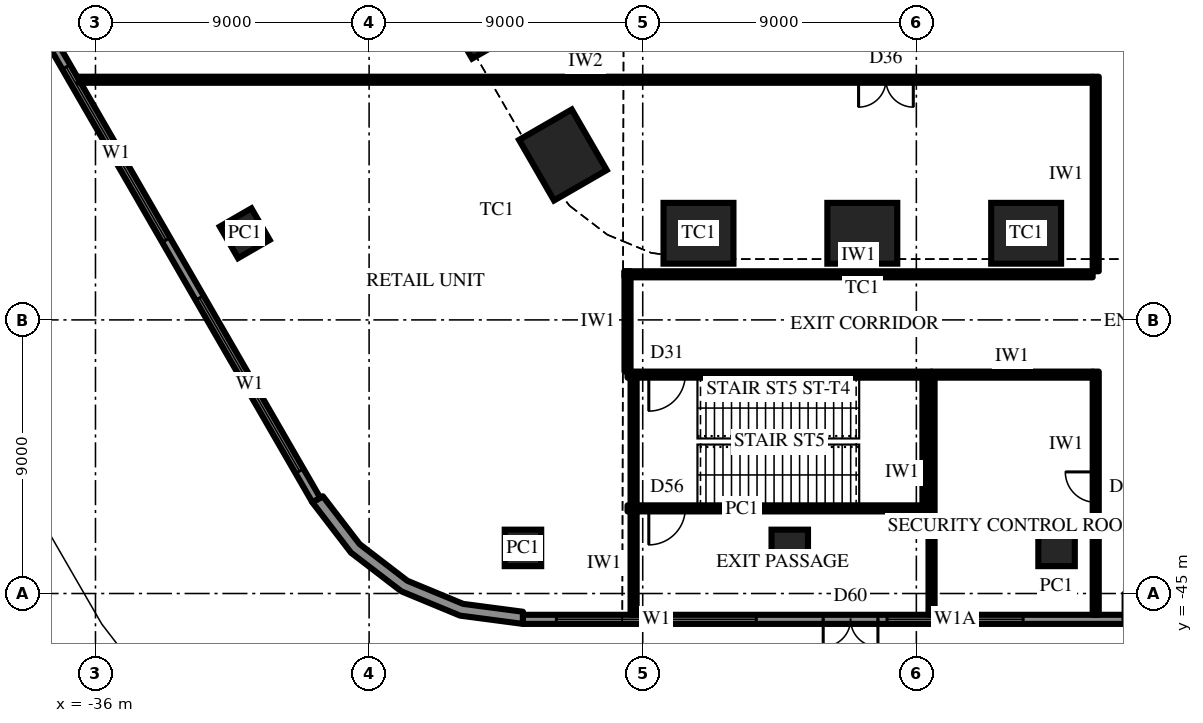
"""IFC4 building model, lengths in metres.
Left out: names, types, materials, properties, quantities, classifications, styles, units other than length and angle.
Written with IfcOpenShell. Run it as: python <this file> out.ifc"""

import sys

from ifc_helpers import new_model, si_unit, direction, frame, frame_2d, origin, origin_2d, place, context, subcontext, project, spatial, polyline, rectangle, outline, extrude, element, fill, save


model = new_model("IFC4")
c1 = context("Model", 3, precision=1e-05, world=origin(), true_north=direction((0.0, 1.0)))
c2 = subcontext(c1, "Body", "Model", "MODEL_VIEW")
j1 = project(units=[si_unit("LENGTHUNIT", "METRE"), si_unit("PLANEANGLEUNIT", "RADIAN")], contexts=[c1])
p1 = place(None, origin())
s1 = spatial("IfcSite", under=j1, at=p1, CompositionType="ELEMENT")
p2 = place(p1, origin())
s2 = spatial("IfcBuilding", under=s1, at=p2, CompositionType="ELEMENT")
p3 = place(p2, origin())
s3 = spatial("IfcBuildingStorey", under=s2, at=p3, CompositionType="ELEMENT", Elevation=0.0)
for number, where, z_axis, x_axis in (
    (1, (-23.32, -25.908, 0.0), (0.0, 0.0, 1.0), (0.5, -0.866, 0.0)),
    (2, (-20.626, -30.575, 0.0), (0.0, 0.0, 1.0), (0.5, -0.866, 0.0)),
    (3, (-16.166, -33.15, 0.0), (0.0, 0.0, 1.0), (1.0, 0.0, 0.0)),
    (4, (-10.777, -33.15, 0.0), (0.0, 0.0, 1.0), (1.0, 0.0, 0.0)),
    (5, (-5.389, -33.15, 0.0), (0.0, 0.0, 1.0), (1.0, 0.0, 0.0)),
):
    element("IfcColumn", number, at=place(p3, frame(where, z_axis=z_axis, x_axis=x_axis)), inside=s3, PredefinedType="COLUMN", context=c2, shape_type="SweptSolid", body=[
        extrude(rectangle(XDim=2.3, YDim=2.0, at=origin_2d()), origin(), (0.0, 0.0, 1.0), 7.0),
    ])
p4 = place(p3, frame((-18.5, -42.2, 0.0), z_axis=(0.0, 0.0, 1.0), x_axis=(1.0, 0.0, 0.0)))
e6 = element("IfcWall", 6, at=p4, inside=s3, PredefinedType="SHEAR", context=c2, shape_type="SweptSolid", body=[
    extrude(rectangle(XDim=10.0, YDim=0.2, at=frame_2d((5.0, 0.0))), origin(), (0.0, 0.0, 1.0), 7.0),
])
p5 = place(p4, frame((0.7, 0.0, 0.0)))
e7 = element("IfcOpeningElement", 7, at=p5, cuts=e6, PredefinedType="OPENING", context=c2, shape_type="SweptSolid", body=[
    extrude(rectangle(XDim=1.2, YDim=2.2, at=frame_2d((0.6, 1.1))), frame((0.0, 0.11, 0.0), z_axis=(0.0, -1.0, 0.0), x_axis=(1.0, 0.0, 0.0)), (0.0, 0.0, 1.0), 0.22),
])
p6 = place(p3, frame((-8.5, -37.8, 0.0), z_axis=(0.0, 0.0, 1.0), x_axis=(-1.0, 0.0, 0.0)))
e8 = element("IfcWall", 8, at=p6, inside=s3, PredefinedType="SHEAR", context=c2, shape_type="SweptSolid", body=[
    extrude(rectangle(XDim=10.0, YDim=0.2, at=frame_2d((5.0, 0.0))), origin(), (0.0, 0.0, 1.0), 7.0),
])
p7 = place(p6, frame((8.1, 0.0, 0.0)))
e9 = element("IfcOpeningElement", 9, at=p7, cuts=e8, PredefinedType="OPENING", context=c2, shape_type="SweptSolid", body=[
    extrude(rectangle(XDim=1.2, YDim=2.2, at=frame_2d((0.6, 1.1))), frame((0.0, 0.11, 0.0), z_axis=(0.0, -1.0, 0.0), x_axis=(1.0, 0.0, 0.0)), (0.0, 0.0, 1.0), 0.22),
])
for number, where, z_axis, x_axis in (
    (10, (-18.3, -37.9, 0.0), (0.0, 0.0, 1.0), (0.0, -1.0, 0.0)),
    (11, (-8.7, -42.1, 0.0), (0.0, 0.0, 1.0), (0.0, 1.0, 0.0)),
):
    element("IfcWall", number, at=place(p3, frame(where, z_axis=z_axis, x_axis=x_axis)), inside=s3, PredefinedType="SHEAR", context=c2, shape_type="SweptSolid", body=[
        extrude(rectangle(XDim=4.2, YDim=0.2, at=frame_2d((2.1, 0.0))), origin(), (0.0, 0.0, 1.0), 7.0),
    ])
for number, where, z_axis, x_axis in (
    (12, (-31.09, -33.15, 0.0), (0.0, 0.0, 1.0), (0.5, -0.866, 0.0)),
    (13, (-21.939, -43.5, 0.0), (0.0, 0.0, 1.0), (1.0, 0.0, 0.0)),
    (14, (-13.164, -43.5, 0.0), (0.0, 0.0, 1.0), (1.0, 0.0, 0.0)),
    (15, (-4.388, -43.5, 0.0), (0.0, 0.0, 1.0), (1.0, 0.0, 0.0)),
):
    element("IfcColumn", number, at=place(p3, frame(where, z_axis=z_axis, x_axis=x_axis)), inside=s3, PredefinedType="COLUMN", context=c2, shape_type="SweptSolid", body=[
        extrude(rectangle(XDim=1.2, YDim=1.2, at=origin_2d()), origin(), (0.0, 0.0, 1.0), 7.0),
    ])
p8 = place(p3, origin())
e16 = element("IfcWall", 16, at=p8, inside=s3, PredefinedType="SOLIDWALL", context=c2, shape_type="SweptSolid", body=[
    extrude(outline(polyline([(-28.867, -42.0), (-27.596, -43.657), (-25.939, -44.928), (-24.01, -45.727), (-21.939, -46.0), (-21.939, -45.6), (-23.906, -45.341), (-25.739, -44.582), (-27.313, -43.374), (-28.521, -41.8), (-28.867, -42.0)])), origin(), (0.0, 0.0, 1.0), 6.65),
])
p9 = place(p3, frame((-50.677, -3.925, 0.0), z_axis=(0.0, 0.0, 1.0), x_axis=(0.500002442456, -0.866023993627, 0.0)))
e17 = element("IfcWall", 17, at=p9, inside=s3, PredefinedType="SOLIDWALL", context=c2, shape_type="SweptSolid", body=[
    extrude(rectangle(XDim=43.879, YDim=0.3, at=frame_2d((21.939, 0.0))), origin(), (0.0, 0.0, 1.0), 6.65),
])
p10 = place(p9, frame((1.1, 0.0, 0.3)))
e18 = element("IfcOpeningElement", 18, at=p10, cuts=e17, PredefinedType="OPENING", context=c2, shape_type="SweptSolid", body=[
    extrude(rectangle(XDim=6.576, YDim=5.0, at=frame_2d((3.288, 2.5))), frame((0.0, 0.16, 0.0), z_axis=(0.0, -1.0, 0.0), x_axis=(1.0, 0.0, 0.0)), (0.0, 0.0, 1.0), 0.32),
])
p11 = place(p9, frame((9.875, 0.0, 0.3)))
e19 = element("IfcOpeningElement", 19, at=p11, cuts=e17, PredefinedType="OPENING", context=c2, shape_type="SweptSolid", body=[
    extrude(rectangle(XDim=6.576, YDim=5.0, at=frame_2d((3.288, 2.5))), frame((0.0, 0.16, 0.0), z_axis=(0.0, -1.0, 0.0), x_axis=(1.0, 0.0, 0.0)), (0.0, 0.0, 1.0), 0.32),
])
p12 = place(p9, frame((19.739, 0.0, 0.0)))
e20 = element("IfcOpeningElement", 20, at=p12, cuts=e17, PredefinedType="OPENING", context=c2, shape_type="SweptSolid", body=[
    extrude(rectangle(XDim=1.8, YDim=2.7, at=frame_2d((0.9, 1.35))), frame((0.0, 0.16, 0.0), z_axis=(0.0, -1.0, 0.0), x_axis=(1.0, 0.0, 0.0)), (0.0, 0.0, 1.0), 0.32),
])
p13 = place(p9, frame((22.339, 0.0, 0.0)))
e21 = element("IfcOpeningElement", 21, at=p13, cuts=e17, PredefinedType="OPENING", context=c2, shape_type="SweptSolid", body=[
    extrude(rectangle(XDim=1.8, YDim=2.7, at=frame_2d((0.9, 1.35))), frame((0.0, 0.16, 0.0), z_axis=(0.0, -1.0, 0.0), x_axis=(1.0, 0.0, 0.0)), (0.0, 0.0, 1.0), 0.32),
])
p14 = place(p9, frame((27.427, 0.0, 0.3)))
e22 = element("IfcOpeningElement", 22, at=p14, cuts=e17, PredefinedType="OPENING", context=c2, shape_type="SweptSolid", body=[
    extrude(rectangle(XDim=6.576, YDim=5.0, at=frame_2d((3.288, 2.5))), frame((0.0, 0.16, 0.0), z_axis=(0.0, -1.0, 0.0), x_axis=(1.0, 0.0, 0.0)), (0.0, 0.0, 1.0), 0.32),
])
p15 = place(p9, frame((36.203, 0.0, 0.3)))
e23 = element("IfcOpeningElement", 23, at=p15, cuts=e17, PredefinedType="OPENING", context=c2, shape_type="SweptSolid", body=[
    extrude(rectangle(XDim=6.576, YDim=5.0, at=frame_2d((3.288, 2.5))), frame((0.0, 0.16, 0.0), z_axis=(0.0, -1.0, 0.0), x_axis=(1.0, 0.0, 0.0)), (0.0, 0.0, 1.0), 0.32),
])
p16 = place(p3, frame((-21.939, -45.85, 0.0), z_axis=(0.0, 0.0, 1.0), x_axis=(1.0, 0.0, 0.0)))
e24 = element("IfcWall", 24, at=p16, inside=s3, PredefinedType="SOLIDWALL", context=c2, shape_type="SweptSolid", body=[
    extrude(rectangle(XDim=43.878, YDim=0.3, at=frame_2d((21.939, 0.0))), origin(), (0.0, 0.0, 1.0), 6.65),
])
p17 = place(p16, frame((1.1, 0.0, 0.3)))
e25 = element("IfcOpeningElement", 25, at=p17, cuts=e24, PredefinedType="OPENING", context=c2, shape_type="SweptSolid", body=[
    extrude(rectangle(XDim=6.576, YDim=5.0, at=frame_2d((3.288, 2.5))), frame((0.0, 0.16, 0.0), z_axis=(0.0, -1.0, 0.0), x_axis=(1.0, 0.0, 0.0)), (0.0, 0.0, 1.0), 0.32),
])
p18 = place(p16, frame((9.875, 0.0, 0.0)))
e26 = element("IfcOpeningElement", 26, at=p18, cuts=e24, PredefinedType="OPENING", context=c2, shape_type="SweptSolid", body=[
    extrude(rectangle(XDim=1.8, YDim=2.4, at=frame_2d((0.9, 1.2))), frame((0.0, 0.16, 0.0), z_axis=(0.0, -1.0, 0.0), x_axis=(1.0, 0.0, 0.0)), (0.0, 0.0, 1.0), 0.32),
])
p19 = place(p16, frame((11.976, 0.0, 0.3)))
e27 = element("IfcOpeningElement", 27, at=p19, cuts=e24, PredefinedType="OPENING", context=c2, shape_type="SweptSolid", body=[
    extrude(rectangle(XDim=4.476, YDim=5.0, at=frame_2d((2.238, 2.5))), frame((0.0, 0.16, 0.0), z_axis=(0.0, -1.0, 0.0), x_axis=(1.0, 0.0, 0.0)), (0.0, 0.0, 1.0), 0.32),
])
p20 = place(p16, frame((19.739, 0.0, 0.0)))
e28 = element("IfcOpeningElement", 28, at=p20, cuts=e24, PredefinedType="OPENING", context=c2, shape_type="SweptSolid", body=[
    extrude(rectangle(XDim=1.8, YDim=2.7, at=frame_2d((0.9, 1.35))), frame((0.0, 0.16, 0.0), z_axis=(0.0, -1.0, 0.0), x_axis=(1.0, 0.0, 0.0)), (0.0, 0.0, 1.0), 0.32),
])
p21 = place(p16, frame((22.339, 0.0, 0.0)))
e29 = element("IfcOpeningElement", 29, at=p21, cuts=e24, PredefinedType="OPENING", context=c2, shape_type="SweptSolid", body=[
    extrude(rectangle(XDim=1.8, YDim=2.7, at=frame_2d((0.9, 1.35))), frame((0.0, 0.16, 0.0), z_axis=(0.0, -1.0, 0.0), x_axis=(1.0, 0.0, 0.0)), (0.0, 0.0, 1.0), 0.32),
])
p22 = place(p16, frame((32.203, 0.0, 0.0)))
e30 = element("IfcOpeningElement", 30, at=p22, cuts=e24, PredefinedType="OPENING", context=c2, shape_type="SweptSolid", body=[
    extrude(rectangle(XDim=1.8, YDim=2.4, at=frame_2d((0.9, 1.2))), frame((0.0, 0.16, 0.0), z_axis=(0.0, -1.0, 0.0), x_axis=(1.0, 0.0, 0.0)), (0.0, 0.0, 1.0), 0.32),
])
p23 = place(p16, frame((27.427, 0.0, 0.3)))
e31 = element("IfcOpeningElement", 31, at=p23, cuts=e24, PredefinedType="OPENING", context=c2, shape_type="SweptSolid", body=[
    extrude(rectangle(XDim=4.476, YDim=5.0, at=frame_2d((2.238, 2.5))), frame((0.0, 0.16, 0.0), z_axis=(0.0, -1.0, 0.0), x_axis=(1.0, 0.0, 0.0)), (0.0, 0.0, 1.0), 0.32),
])
p24 = place(p16, frame((36.203, 0.0, 0.3)))
e32 = element("IfcOpeningElement", 32, at=p24, cuts=e24, PredefinedType="OPENING", context=c2, shape_type="SweptSolid", body=[
    extrude(rectangle(XDim=6.576, YDim=5.0, at=frame_2d((3.288, 2.5))), frame((0.0, 0.16, 0.0), z_axis=(0.0, -1.0, 0.0), x_axis=(1.0, 0.0, 0.0)), (0.0, 0.0, 1.0), 0.32),
])
p25 = place(p3, frame((-36.546, -28.1, 0.0), z_axis=(0.0, 0.0, 1.0), x_axis=(1.0, 0.0, 0.0)))
e33 = element("IfcWall", 33, at=p25, inside=s3, PredefinedType="PARTITIONING", context=c2, shape_type="SweptSolid", body=[
    extrude(rectangle(XDim=33.346, YDim=0.2, at=frame_2d((16.673, 0.0))), origin(), (0.0, 0.0, 1.0), 6.65),
])
p26 = place(p25, frame((25.646, 0.0, 0.0)))
e34 = element("IfcOpeningElement", 34, at=p26, cuts=e33, PredefinedType="OPENING", context=c2, shape_type="SweptSolid", body=[
    extrude(rectangle(XDim=1.8, YDim=2.4, at=frame_2d((0.9, 1.2))), frame((0.0, 0.11, 0.0), z_axis=(0.0, -1.0, 0.0), x_axis=(1.0, 0.0, 0.0)), (0.0, 0.0, 1.0), 0.22),
])
p27 = place(p3, frame((-3.1, -45.7, 0.0), z_axis=(0.0, 0.0, 1.0), x_axis=(0.0, 1.0, 0.0)))
e35 = element("IfcWall", 35, at=p27, inside=s3, PredefinedType="PARTITIONING", context=c2, shape_type="SweptSolid", body=[
    extrude(rectangle(XDim=8.0, YDim=0.2, at=frame_2d((4.0, 0.0))), origin(), (0.0, 0.0, 1.0), 6.65),
])
p28 = place(p27, frame((3.7, 0.0, 0.0)))
e36 = element("IfcOpeningElement", 36, at=p28, cuts=e35, PredefinedType="OPENING", context=c2, shape_type="SweptSolid", body=[
    extrude(rectangle(XDim=1.0, YDim=2.2, at=frame_2d((0.5, 1.1))), frame((0.0, 0.11, 0.0), z_axis=(0.0, -1.0, 0.0), x_axis=(1.0, 0.0, 0.0)), (0.0, 0.0, 1.0), 0.22),
])
p29 = place(p3, frame((-3.1, -34.4, 0.0), z_axis=(0.0, 0.0, 1.0), x_axis=(0.0, 1.0, 0.0)))
e37 = element("IfcWall", 37, at=p29, inside=s3, PredefinedType="PARTITIONING", context=c2, shape_type="SweptSolid", body=[
    extrude(rectangle(XDim=6.4, YDim=0.2, at=frame_2d((3.2, 0.0))), origin(), (0.0, 0.0, 1.0), 6.65),
])
p30 = place(p3, frame((-18.6, -34.5, 0.0), z_axis=(0.0, 0.0, 1.0), x_axis=(1.0, 0.0, 0.0)))
e38 = element("IfcWall", 38, at=p30, inside=s3, PredefinedType="PARTITIONING", context=c2, shape_type="SweptSolid", body=[
    extrude(rectangle(XDim=15.4, YDim=0.2, at=frame_2d((7.7, 0.0))), origin(), (0.0, 0.0, 1.0), 6.65),
])
p31 = place(p3, frame((-18.5, -37.7, 0.0), z_axis=(0.0, 0.0, 1.0), x_axis=(0.0, 1.0, 0.0)))
e39 = element("IfcWall", 39, at=p31, inside=s3, PredefinedType="PARTITIONING", context=c2, shape_type="SweptSolid", body=[
    extrude(rectangle(XDim=3.3, YDim=0.2, at=frame_2d((1.65, 0.0))), origin(), (0.0, 0.0, 1.0), 6.65),
])
p32 = place(p3, frame((-8.5, -37.8, 0.0), z_axis=(0.0, 0.0, 1.0), x_axis=(1.0, 0.0, 0.0)))
e40 = element("IfcWall", 40, at=p32, inside=s3, PredefinedType="PARTITIONING", context=c2, shape_type="SweptSolid", body=[
    extrude(rectangle(XDim=5.3, YDim=0.2, at=frame_2d((2.65, 0.0))), origin(), (0.0, 0.0, 1.0), 6.65),
])
p33 = place(p3, frame((-8.5, -45.7, 0.0), z_axis=(0.0, 0.0, 1.0), x_axis=(0.0, 1.0, 0.0)))
e41 = element("IfcWall", 41, at=p33, inside=s3, PredefinedType="PARTITIONING", context=c2, shape_type="SweptSolid", body=[
    extrude(rectangle(XDim=7.8, YDim=0.2, at=frame_2d((3.9, 0.0))), origin(), (0.0, 0.0, 1.0), 6.65),
])
p34 = place(p3, frame((-18.3, -45.7, 0.0), z_axis=(0.0, 0.0, 1.0), x_axis=(0.0, 1.0, 0.0)))
e42 = element("IfcWall", 42, at=p34, inside=s3, PredefinedType="PARTITIONING", context=c2, shape_type="SweptSolid", body=[
    extrude(rectangle(XDim=3.4, YDim=0.2, at=frame_2d((1.7, 0.0))), origin(), (0.0, 0.0, 1.0), 6.65),
])
p35 = place(p14, origin())
e43 = element("IfcWindow", 43, at=p35, inside=s3, PartitioningType="SINGLE_PANEL", PredefinedType="WINDOW", context=c2, shape_type="SweptSolid", body=[
    extrude(rectangle(XDim=6.576, YDim=5.0, at=frame_2d((3.288, 2.5))), frame((0.0, 0.03, 0.0), z_axis=(0.0, -1.0, 0.0), x_axis=(1.0, 0.0, 0.0)), (0.0, 0.0, 1.0), 0.06),
])
fill(e22, e43)
p36 = place(p15, origin())
e44 = element("IfcWindow", 44, at=p36, inside=s3, PartitioningType="SINGLE_PANEL", PredefinedType="WINDOW", context=c2, shape_type="SweptSolid", body=[
    extrude(rectangle(XDim=6.576, YDim=5.0, at=frame_2d((3.288, 2.5))), frame((0.0, 0.03, 0.0), z_axis=(0.0, -1.0, 0.0), x_axis=(1.0, 0.0, 0.0)), (0.0, 0.0, 1.0), 0.06),
])
fill(e23, e44)
p37 = place(p17, origin())
e45 = element("IfcWindow", 45, at=p37, inside=s3, PartitioningType="SINGLE_PANEL", PredefinedType="WINDOW", context=c2, shape_type="SweptSolid", body=[
    extrude(rectangle(XDim=6.576, YDim=5.0, at=frame_2d((3.288, 2.5))), frame((0.0, 0.03, 0.0), z_axis=(0.0, -1.0, 0.0), x_axis=(1.0, 0.0, 0.0)), (0.0, 0.0, 1.0), 0.06),
])
fill(e25, e45)
p38 = place(p18, frame((1.8, 0.0, 0.0), z_axis=(0.0, 0.0, 1.0), x_axis=(-1.0, 0.0, 0.0)))
e46 = element("IfcDoor", 46, at=p38, inside=s3, OperationType="DOUBLE_DOOR_SINGLE_SWING", PredefinedType="DOOR", context=c2, shape_type="SweptSolid", body=[
    extrude(rectangle(XDim=1.8, YDim=2.4, at=frame_2d((0.9, 1.2))), frame((0.0, 0.025, 0.0), z_axis=(0.0, -1.0, 0.0), x_axis=(1.0, 0.0, 0.0)), (0.0, 0.0, 1.0), 0.05),
])
fill(e26, e46)
p39 = place(p19, origin())
e47 = element("IfcWindow", 47, at=p39, inside=s3, PartitioningType="SINGLE_PANEL", PredefinedType="WINDOW", context=c2, shape_type="SweptSolid", body=[
    extrude(rectangle(XDim=4.476, YDim=5.0, at=frame_2d((2.238, 2.5))), frame((0.0, 0.03, 0.0), z_axis=(0.0, -1.0, 0.0), x_axis=(1.0, 0.0, 0.0)), (0.0, 0.0, 1.0), 0.06),
])
fill(e27, e47)
p40 = place(p28, origin())
e48 = element("IfcDoor", 48, at=p40, inside=s3, OperationType="SINGLE_SWING_LEFT", PredefinedType="DOOR", context=c2, shape_type="SweptSolid", body=[
    extrude(rectangle(XDim=1.0, YDim=2.2, at=frame_2d((0.5, 1.1))), frame((0.0, 0.025, 0.0), z_axis=(0.0, -1.0, 0.0), x_axis=(1.0, 0.0, 0.0)), (0.0, 0.0, 1.0), 0.05),
])
fill(e36, e48)
p41 = place(p26, frame((1.8, 0.0, 0.0), z_axis=(0.0, 0.0, 1.0), x_axis=(-1.0, 0.0, 0.0)))
e49 = element("IfcDoor", 49, at=p41, inside=s3, OperationType="DOUBLE_DOOR_SINGLE_SWING", PredefinedType="DOOR", context=c2, shape_type="SweptSolid", body=[
    extrude(rectangle(XDim=1.8, YDim=2.4, at=frame_2d((0.9, 1.2))), frame((0.0, 0.025, 0.0), z_axis=(0.0, -1.0, 0.0), x_axis=(1.0, 0.0, 0.0)), (0.0, 0.0, 1.0), 0.05),
])
fill(e34, e49)
p42 = place(p7, origin())
e50 = element("IfcDoor", 50, at=p42, inside=s3, OperationType="SINGLE_SWING_LEFT", PredefinedType="DOOR", context=c2, shape_type="SweptSolid", body=[
    extrude(rectangle(XDim=1.2, YDim=2.2, at=frame_2d((0.6, 1.1))), frame((0.0, 0.025, 0.0), z_axis=(0.0, -1.0, 0.0), x_axis=(1.0, 0.0, 0.0)), (0.0, 0.0, 1.0), 0.05),
])
fill(e9, e50)
p43 = place(p5, frame((1.2, 0.0, 0.0), z_axis=(0.0, 0.0, 1.0), x_axis=(-1.0, 0.0, 0.0)))
e51 = element("IfcDoor", 51, at=p43, inside=s3, OperationType="SINGLE_SWING_LEFT", PredefinedType="DOOR", context=c2, shape_type="SweptSolid", body=[
    extrude(rectangle(XDim=1.2, YDim=2.2, at=frame_2d((0.6, 1.1))), frame((0.0, 0.025, 0.0), z_axis=(0.0, -1.0, 0.0), x_axis=(1.0, 0.0, 0.0)), (0.0, 0.0, 1.0), 0.05),
])
fill(e7, e51)
save(model, sys.argv[1])
